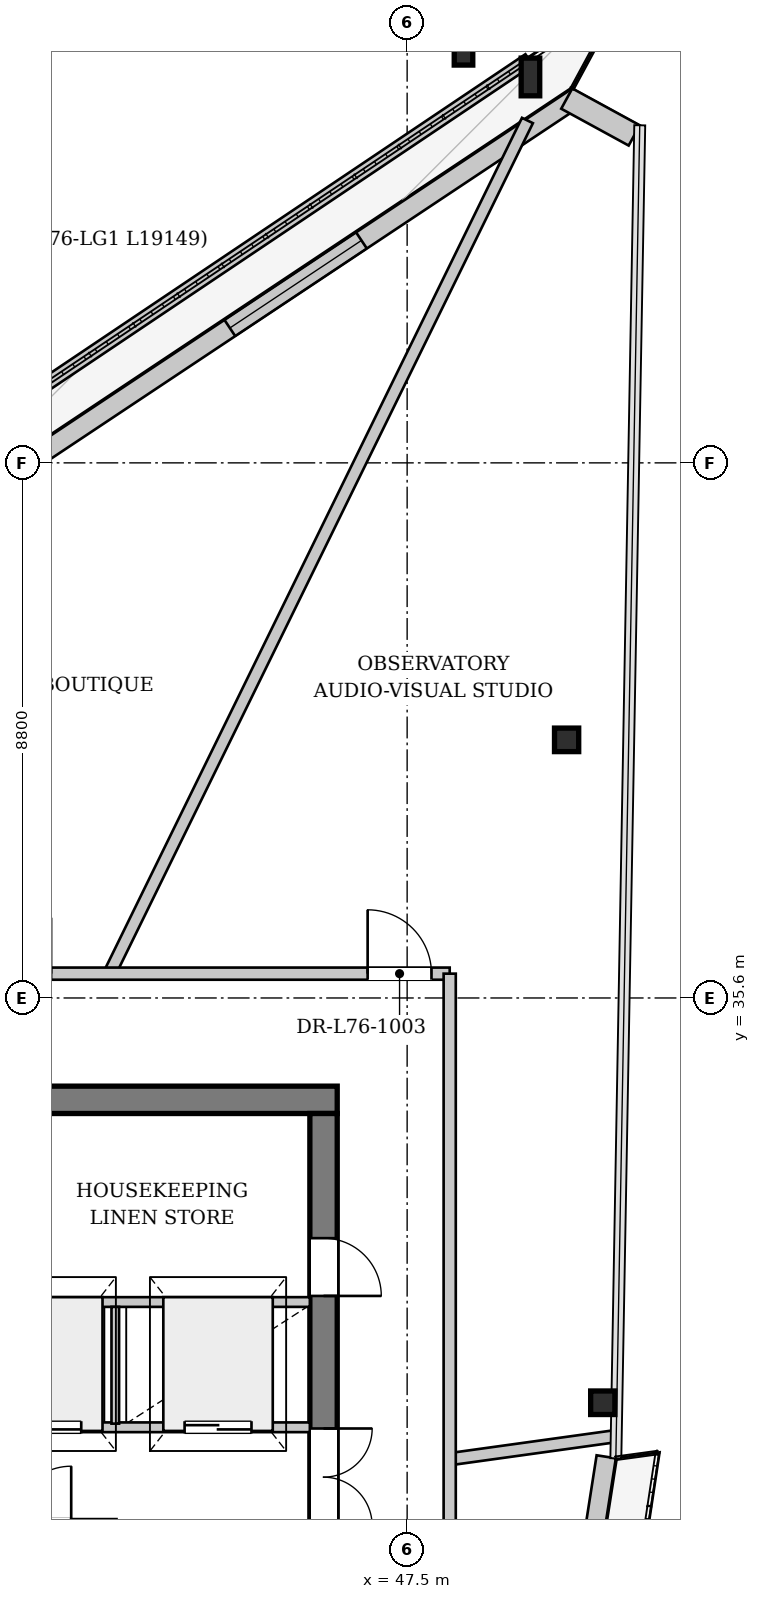
"""IFC4 building model, lengths in metres.
Left out: names, types, materials, properties, quantities, classifications, styles, units other than length and angle.
Written with IfcOpenShell. Run it as: python <this file> out.ifc"""

import sys

from ifc_helpers import new_model, si_unit, direction, frame, frame_2d, origin, origin_2d, place, context, subcontext, project, spatial, rectangle, i_section, extrude, source, transform, mapped, element, fill, save


model = new_model("IFC4")
c1 = context("Model", 3, precision=1e-05, world=origin(), true_north=direction((0.0, 1.0)))
c2 = subcontext(c1, "Body", "Model", "MODEL_VIEW")
j1 = project(units=[si_unit("LENGTHUNIT", "METRE"), si_unit("PLANEANGLEUNIT", "RADIAN")], contexts=[c1])
p1 = place(None, origin())
s1 = spatial("IfcSite", under=j1, at=p1, CompositionType="ELEMENT")
p2 = place(p1, origin())
s2 = spatial("IfcBuilding", under=s1, at=p2, CompositionType="ELEMENT")
p3 = place(p2, frame((0.0, 0.0, 286.1)))
s3 = spatial("IfcBuildingStorey", under=s2, at=p3, CompositionType="ELEMENT", Elevation=286.1)
m1 = source(origin(), c2, "Body", "SweptSolid", [
    extrude(i_section(OverallWidth=0.305, OverallDepth=0.62, WebThickness=0.021, FlangeThickness=0.04, at=origin_2d()), origin(), (0.0, 0.0, 1.0), 5.705),
])
p4 = place(p3, frame((51.325, 49.952, 0.0), z_axis=(-0.630132763972, 0.27858501144, 0.724791757107), x_axis=(-0.404351160465, -0.914603815338, 0.0)))
e1 = element("IfcColumn", 1, at=p4, inside=s3, PredefinedType="COLUMN", context=c2, shape_type="MappedRepresentation", body=[
    mapped(m1, transform((0.0, 0.0, 0.0), x_axis=(1.0, 0.0, 0.0), y_axis=(0.0, 1.0, 0.0), z_axis=(0.0, 0.0, 1.0), scale=1.0)),
])
m2 = source(origin(), c2, "Body", "SweptSolid", [
    extrude(i_section(OverallWidth=0.305, OverallDepth=0.62, WebThickness=0.021, FlangeThickness=0.04, at=origin_2d()), origin(), (0.0, 0.0, 1.0), 5.642),
])
p5 = place(p3, frame((50.216, 50.558, 0.0), z_axis=(-0.634270773304, 0.246127176869, 0.732886075007), x_axis=(-0.361764793743, -0.93226939991, 0.0)))
e2 = element("IfcColumn", 2, at=p5, inside=s3, PredefinedType="COLUMN", context=c2, shape_type="MappedRepresentation", body=[
    mapped(m2, transform((0.0, 0.0, 0.0), x_axis=(1.0, 0.0, 0.0), y_axis=(0.0, 1.0, 0.0), z_axis=(0.0, 0.0, 1.0), scale=1.0)),
])
m3 = source(origin(), c2, "Body", "SweptSolid", [
    extrude(i_section(OverallWidth=0.398, OverallDepth=0.387, WebThickness=0.019, FlangeThickness=0.029, at=origin_2d()), origin(), (0.0, 0.0, 1.0), 4.541),
])
p6 = place(p3, frame((50.932, 28.03, 0.0), z_axis=(-0.094735020085, 0.402220593223, 0.910628283306), x_axis=(-0.973365952515, -0.229256891904, 0.0)))
e3 = element("IfcColumn", 3, at=p6, inside=s3, PredefinedType="COLUMN", context=c2, shape_type="MappedRepresentation", body=[
    mapped(m3, transform((0.0, 0.0, 0.0), x_axis=(1.0, 0.0, 0.0), y_axis=(0.0, 1.0, 0.0), z_axis=(0.0, 0.0, 1.0), scale=1.0)),
])
m4 = source(origin(), c2, "Body", "SweptSolid", [
    extrude(i_section(OverallWidth=0.398, OverallDepth=0.387, WebThickness=0.019, FlangeThickness=0.029, at=origin_2d()), origin(), (0.0, 0.0, 1.0), 4.906),
])
p7 = place(p3, frame((51.129, 38.991, 0.0), z_axis=(-0.410278483219, 0.348119600936, 0.842902313232), x_axis=(-0.64698233698, -0.762504987286, 0.0)))
e4 = element("IfcColumn", 4, at=p7, inside=s3, PredefinedType="COLUMN", context=c2, shape_type="MappedRepresentation", body=[
    mapped(m4, transform((0.0, 0.0, 0.0), x_axis=(1.0, 0.0, 0.0), y_axis=(0.0, 1.0, 0.0), z_axis=(0.0, 0.0, 1.0), scale=1.0)),
])
p8 = place(p3, frame((50.774, 28.055, 0.0), z_axis=(0.0, 0.0, 1.0), x_axis=(-0.154256631158, -0.988030815179, 0.0)))
e5 = element("IfcWall", 5, at=p8, inside=s3, PredefinedType="SOLIDWALL", context=c2, shape_type="SweptSolid", body=[
    extrude(rectangle(XDim=21.925, YDim=0.32, at=frame_2d((10.962, 0.0))), origin(), (0.0, 0.0, 1.0), 3.662),
])
p9 = place(p8, frame((6.266, 0.0, 0.0)))
e6 = element("IfcOpeningElement", 6, at=p9, cuts=e5, PredefinedType="OPENING", context=c2, shape_type="SweptSolid", body=[
    extrude(rectangle(XDim=1.5, YDim=2.3, at=frame_2d((0.75, 1.15))), frame((0.0, 0.17, 0.0), z_axis=(0.0, -1.0, 0.0), x_axis=(1.0, 0.0, 0.0)), (0.0, 0.0, 1.0), 0.34),
])
p10 = place(p8, frame((14.924, 0.0, 0.65)))
e7 = element("IfcOpeningElement", 7, at=p10, cuts=e5, PredefinedType="OPENING", context=c2, shape_type="SweptSolid", body=[
    extrude(rectangle(XDim=2.6, YDim=2.35, at=frame_2d((1.3, 1.175))), frame((0.0, 0.17, 0.0), z_axis=(0.0, -1.0, 0.0), x_axis=(1.0, 0.0, 0.0)), (0.0, 0.0, 1.0), 0.34),
])
p11 = place(p3, frame((32.465, 38.554, 0.0), z_axis=(0.0, 0.0, 1.0), x_axis=(0.832540755873, 0.553963798285, 0.0)))
e8 = element("IfcWall", 8, at=p11, inside=s3, PredefinedType="SOLIDWALL", context=c2, shape_type="SweptSolid", body=[
    extrude(rectangle(XDim=21.428, YDim=0.32, at=frame_2d((10.714, 0.0))), origin(), (0.0, 0.0, 1.0), 3.662),
])
p12 = place(p11, frame((5.357, 0.0, 0.0)))
e9 = element("IfcOpeningElement", 9, at=p12, cuts=e8, PredefinedType="OPENING", context=c2, shape_type="SweptSolid", body=[
    extrude(rectangle(XDim=1.5, YDim=2.3, at=frame_2d((0.75, 1.15))), frame((0.0, 0.17, 0.0), z_axis=(0.0, -1.0, 0.0), x_axis=(1.0, 0.0, 0.0)), (0.0, 0.0, 1.0), 0.34),
])
p13 = place(p11, frame((14.557, 0.0, 0.65)))
e10 = element("IfcOpeningElement", 10, at=p13, cuts=e8, PredefinedType="OPENING", context=c2, shape_type="SweptSolid", body=[
    extrude(rectangle(XDim=2.6, YDim=2.35, at=frame_2d((1.3, 1.175))), frame((0.0, 0.17, 0.0), z_axis=(0.0, -1.0, 0.0), x_axis=(1.0, 0.0, 0.0)), (0.0, 0.0, 1.0), 0.34),
])
p14 = place(p3, frame((50.125, 50.391, 0.0), z_axis=(0.0, 0.0, 1.0), x_axis=(0.877570550329, -0.479447524965, 0.0)))
e11 = element("IfcWall", 11, at=p14, inside=s3, PredefinedType="SOLIDWALL", context=c2, shape_type="SweptSolid", body=[
    extrude(rectangle(XDim=1.264, YDim=0.38, at=frame_2d((0.632, 0.0))), origin(), (0.0, 0.0, 1.0), 3.662),
])
p15 = place(p3, frame((49.507, 51.03, 0.0), z_axis=(0.0, 0.0, 1.0), x_axis=(-0.830196011269, -0.557471598266, 0.0)))
e12 = element("IfcWall", 12, at=p15, inside=s3, PredefinedType="PARAPET", context=c2, shape_type="SweptSolid", body=[
    extrude(rectangle(XDim=19.149, YDim=0.22, at=frame_2d((9.574, 0.0))), origin(), (0.0, 0.0, 1.0), 0.3),
])
p16 = place(p3, frame((29.65, 33.925, 0.0), z_axis=(0.0, 0.0, 1.0), x_axis=(1.0, 0.0, 0.0)))
e13 = element("IfcWall", 13, at=p16, inside=s3, PredefinedType="SHEAR", context=c2, shape_type="SweptSolid", body=[
    extrude(rectangle(XDim=16.7, YDim=0.45, at=frame_2d((8.35, 0.0))), origin(), (0.0, 0.0, 1.0), 4.12),
])
p17 = place(p16, frame((1.45, 0.0, 0.0)))
e14 = element("IfcOpeningElement", 14, at=p17, cuts=e13, PredefinedType="OPENING", context=c2, shape_type="SweptSolid", body=[
    extrude(rectangle(XDim=0.95, YDim=2.1, at=frame_2d((0.475, 1.05))), frame((0.0, 0.235, 0.0), z_axis=(0.0, -1.0, 0.0), x_axis=(1.0, 0.0, 0.0)), (0.0, 0.0, 1.0), 0.47),
])
p18 = place(p16, frame((3.83, 0.0, 0.0)))
e15 = element("IfcOpeningElement", 15, at=p18, cuts=e13, PredefinedType="OPENING", context=c2, shape_type="SweptSolid", body=[
    extrude(rectangle(XDim=1.32, YDim=2.2, at=frame_2d((0.66, 1.1))), frame((0.0, 0.235, 0.0), z_axis=(0.0, -1.0, 0.0), x_axis=(1.0, 0.0, 0.0)), (0.0, 0.0, 1.0), 0.47),
])
p19 = place(p3, frame((46.125, 33.7, 0.0), z_axis=(0.0, 0.0, 1.0), x_axis=(0.0, -1.0, 0.0)))
e16 = element("IfcWall", 16, at=p19, inside=s3, PredefinedType="SHEAR", context=c2, shape_type="SweptSolid", body=[
    extrude(rectangle(XDim=14.2, YDim=0.45, at=frame_2d((7.1, 0.0))), origin(), (0.0, 0.0, 1.0), 4.12),
])
p20 = place(p19, frame((5.18, 0.0, 0.0)))
e17 = element("IfcOpeningElement", 17, at=p20, cuts=e16, PredefinedType="OPENING", context=c2, shape_type="SweptSolid", body=[
    extrude(rectangle(XDim=1.6, YDim=2.2, at=frame_2d((0.8, 1.1))), frame((0.0, 0.235, 0.0), z_axis=(0.0, -1.0, 0.0), x_axis=(1.0, 0.0, 0.0)), (0.0, 0.0, 1.0), 0.47),
])
p21 = place(p19, frame((2.05, 0.0, 0.0)))
e18 = element("IfcOpeningElement", 18, at=p21, cuts=e16, PredefinedType="OPENING", context=c2, shape_type="SweptSolid", body=[
    extrude(rectangle(XDim=0.95, YDim=2.1, at=frame_2d((0.475, 1.05))), frame((0.0, 0.235, 0.0), z_axis=(0.0, -1.0, 0.0), x_axis=(1.0, 0.0, 0.0)), (0.0, 0.0, 1.0), 0.47),
])
p22 = place(p3, frame((33.28, 26.95, 0.0), z_axis=(0.0, 0.0, 1.0), x_axis=(1.0, 0.0, 0.0)))
e19 = element("IfcWall", 19, at=p22, inside=s3, PredefinedType="PARTITIONING", context=c2, shape_type="SweptSolid", body=[
    extrude(rectangle(XDim=9.44, YDim=0.16, at=frame_2d((4.72, 0.0))), origin(), (0.0, 0.0, 1.0), 4.12),
])
p23 = place(p22, frame((1.2, 0.0, 0.0)))
e20 = element("IfcOpeningElement", 20, at=p23, cuts=e19, PredefinedType="OPENING", context=c2, shape_type="SweptSolid", body=[
    extrude(rectangle(XDim=0.95, YDim=2.1, at=frame_2d((0.475, 1.05))), frame((0.0, 0.09, 0.0), z_axis=(0.0, -1.0, 0.0), x_axis=(1.0, 0.0, 0.0)), (0.0, 0.0, 1.0), 0.18),
])
p24 = place(p22, frame((4.65, 0.0, 0.0)))
e21 = element("IfcOpeningElement", 21, at=p24, cuts=e19, PredefinedType="OPENING", context=c2, shape_type="SweptSolid", body=[
    extrude(rectangle(XDim=0.95, YDim=2.1, at=frame_2d((0.475, 1.05))), frame((0.0, 0.09, 0.0), z_axis=(0.0, -1.0, 0.0), x_axis=(1.0, 0.0, 0.0)), (0.0, 0.0, 1.0), 0.18),
])
p25 = place(p22, frame((7.745, 0.0, 0.0)))
e22 = element("IfcOpeningElement", 22, at=p25, cuts=e19, PredefinedType="OPENING", context=c2, shape_type="SweptSolid", body=[
    extrude(rectangle(XDim=0.95, YDim=2.1, at=frame_2d((0.475, 1.05))), frame((0.0, 0.09, 0.0), z_axis=(0.0, -1.0, 0.0), x_axis=(1.0, 0.0, 0.0)), (0.0, 0.0, 1.0), 0.18),
])
p26 = place(p3, frame((33.28, 28.54, 0.0), z_axis=(0.0, 0.0, 1.0), x_axis=(1.0, 0.0, 0.0)))
e23 = element("IfcWall", 23, at=p26, inside=s3, PredefinedType="PARTITIONING", context=c2, shape_type="SweptSolid", body=[
    extrude(rectangle(XDim=12.62, YDim=0.16, at=frame_2d((6.31, 0.0))), origin(), (0.0, 0.0, 1.0), 4.12),
])
p27 = place(p26, frame((0.8, 0.0, 0.0)))
e24 = element("IfcOpeningElement", 24, at=p27, cuts=e23, PredefinedType="OPENING", context=c2, shape_type="SweptSolid", body=[
    extrude(rectangle(XDim=0.95, YDim=2.1, at=frame_2d((0.475, 1.05))), frame((0.0, 0.09, 0.0), z_axis=(0.0, -1.0, 0.0), x_axis=(1.0, 0.0, 0.0)), (0.0, 0.0, 1.0), 0.18),
])
p28 = place(p26, frame((3.3, 0.0, 0.0)))
e25 = element("IfcOpeningElement", 25, at=p28, cuts=e23, PredefinedType="OPENING", context=c2, shape_type="SweptSolid", body=[
    extrude(rectangle(XDim=0.95, YDim=2.1, at=frame_2d((0.475, 1.05))), frame((0.0, 0.09, 0.0), z_axis=(0.0, -1.0, 0.0), x_axis=(1.0, 0.0, 0.0)), (0.0, 0.0, 1.0), 0.18),
])
p29 = place(p26, frame((5.63, 0.0, 0.0)))
e26 = element("IfcOpeningElement", 26, at=p29, cuts=e23, PredefinedType="OPENING", context=c2, shape_type="SweptSolid", body=[
    extrude(rectangle(XDim=1.1, YDim=2.2, at=frame_2d((0.55, 1.1))), frame((0.0, 0.09, 0.0), z_axis=(0.0, -1.0, 0.0), x_axis=(1.0, 0.0, 0.0)), (0.0, 0.0, 1.0), 0.18),
])
p30 = place(p26, frame((7.76, 0.0, 0.0)))
e27 = element("IfcOpeningElement", 27, at=p30, cuts=e23, PredefinedType="OPENING", context=c2, shape_type="SweptSolid", body=[
    extrude(rectangle(XDim=1.1, YDim=2.2, at=frame_2d((0.55, 1.1))), frame((0.0, 0.09, 0.0), z_axis=(0.0, -1.0, 0.0), x_axis=(1.0, 0.0, 0.0)), (0.0, 0.0, 1.0), 0.18),
])
p31 = place(p26, frame((10.56, 0.0, 0.0)))
e28 = element("IfcOpeningElement", 28, at=p31, cuts=e23, PredefinedType="OPENING", context=c2, shape_type="SweptSolid", body=[
    extrude(rectangle(XDim=1.1, YDim=2.2, at=frame_2d((0.55, 1.1))), frame((0.0, 0.09, 0.0), z_axis=(0.0, -1.0, 0.0), x_axis=(1.0, 0.0, 0.0)), (0.0, 0.0, 1.0), 0.18),
])
p32 = place(p3, frame((40.72, 30.6, 0.0), z_axis=(0.0, 0.0, 1.0), x_axis=(1.0, 0.0, 0.0)))
e29 = element("IfcWall", 29, at=p32, inside=s3, PredefinedType="PARTITIONING", context=c2, shape_type="SweptSolid", body=[
    extrude(rectangle(XDim=5.18, YDim=0.16, at=frame_2d((2.59, 0.0))), origin(), (0.0, 0.0, 1.0), 4.12),
])
p33 = place(p3, frame((42.7, 28.6, 0.0), z_axis=(0.0, 0.0, 1.0), x_axis=(0.0, 1.0, 0.0)))
e30 = element("IfcWall", 30, at=p33, inside=s3, PredefinedType="PARTITIONING", context=c2, shape_type="SweptSolid", body=[
    extrude(rectangle(XDim=1.92, YDim=0.125, at=frame_2d((0.96, 0.0))), origin(), (0.0, 0.0, 1.0), 4.12),
])
p34 = place(p3, frame((48.2, 28.015, 0.0), z_axis=(0.0, 0.0, 1.0), x_axis=(0.990516249749, 0.137395629415, 0.0)))
e31 = element("IfcWall", 31, at=p34, inside=s3, PredefinedType="PARTITIONING", context=c2, shape_type="SweptSolid", body=[
    extrude(rectangle(XDim=2.735, YDim=0.2, at=frame_2d((1.367, 0.0))), origin(), (0.0, 0.0, 1.0), 4.12),
])
p35 = place(p3, frame((42.605, 36.0, 0.0), z_axis=(0.0, 0.0, 1.0), x_axis=(0.439942035574, 0.898026171854, 0.0)))
e32 = element("IfcWall", 32, at=p35, inside=s3, PredefinedType="PARTITIONING", context=c2, shape_type="SweptSolid", body=[
    extrude(rectangle(XDim=15.624, YDim=0.2, at=frame_2d((7.812, 0.0))), origin(), (0.0, 0.0, 1.0), 4.12),
])
p36 = place(p3, frame((29.402, 36.0, 0.0), z_axis=(0.0, 0.0, 1.0), x_axis=(1.0, 0.0, 0.0)))
e33 = element("IfcWall", 33, at=p36, inside=s3, PredefinedType="PARTITIONING", context=c2, shape_type="SweptSolid", body=[
    extrude(rectangle(XDim=18.798, YDim=0.2, at=frame_2d((9.399, 0.0))), origin(), (0.0, 0.0, 1.0), 4.12),
])
p37 = place(p36, frame((17.448, 0.0, 0.0)))
e34 = element("IfcOpeningElement", 34, at=p37, cuts=e33, PredefinedType="OPENING", context=c2, shape_type="SweptSolid", body=[
    extrude(rectangle(XDim=1.05, YDim=2.2, at=frame_2d((0.525, 1.1))), frame((0.0, 0.11, 0.0), z_axis=(0.0, -1.0, 0.0), x_axis=(1.0, 0.0, 0.0)), (0.0, 0.0, 1.0), 0.22),
])
p38 = place(p36, frame((11.322, 0.0, 0.0)))
e35 = element("IfcOpeningElement", 35, at=p38, cuts=e33, PredefinedType="OPENING", context=c2, shape_type="SweptSolid", body=[
    extrude(rectangle(XDim=0.92, YDim=2.1, at=frame_2d((0.46, 1.05))), frame((0.0, 0.11, 0.0), z_axis=(0.0, -1.0, 0.0), x_axis=(1.0, 0.0, 0.0)), (0.0, 0.0, 1.0), 0.22),
])
p39 = place(p36, frame((6.742, 0.0, 0.0)))
e36 = element("IfcOpeningElement", 36, at=p39, cuts=e33, PredefinedType="OPENING", context=c2, shape_type="SweptSolid", body=[
    extrude(rectangle(XDim=0.9, YDim=2.1, at=frame_2d((0.45, 1.05))), frame((0.0, 0.11, 0.0), z_axis=(0.0, -1.0, 0.0), x_axis=(1.0, 0.0, 0.0)), (0.0, 0.0, 1.0), 0.22),
])
p40 = place(p3, frame((48.2, 23.0, 0.0), z_axis=(0.0, 0.0, 1.0), x_axis=(0.0, 1.0, 0.0)))
e37 = element("IfcWall", 37, at=p40, inside=s3, PredefinedType="PARTITIONING", context=c2, shape_type="SweptSolid", body=[
    extrude(rectangle(XDim=13.0, YDim=0.2, at=frame_2d((6.5, 0.0))), origin(), (0.0, 0.0, 1.0), 3.745),
])
m5 = source(origin(), c2, "Body", "SweptSolid", [
    extrude(rectangle(XDim=2.6, YDim=2.35, at=frame_2d((1.3, 1.175))), frame((0.0, 0.03, 0.0), z_axis=(0.0, -1.0, 0.0), x_axis=(1.0, 0.0, 0.0)), (0.0, 0.0, 1.0), 0.06),
])
p41 = place(p13, origin())
e38 = element("IfcWindow", 38, at=p41, inside=s3, PartitioningType="SINGLE_PANEL", PredefinedType="WINDOW", context=c2, shape_type="MappedRepresentation", body=[
    mapped(m5, transform((0.0, 0.0, 0.0), x_axis=(1.0, 0.0, 0.0), y_axis=(0.0, 1.0, 0.0), z_axis=(0.0, 0.0, 1.0), scale=1.0)),
])
fill(e10, e38)
m6 = source(origin(), c2, "Body", "SweptSolid", [
    extrude(rectangle(XDim=1.6, YDim=2.2, at=frame_2d((0.8, 1.1))), frame((0.0, 0.025, 0.0), z_axis=(0.0, -1.0, 0.0), x_axis=(1.0, 0.0, 0.0)), (0.0, 0.0, 1.0), 0.05),
])
p42 = place(p20, origin())
e39 = element("IfcDoor", 39, at=p42, inside=s3, OperationType="DOUBLE_DOOR_SINGLE_SWING", PredefinedType="DOOR", context=c2, shape_type="MappedRepresentation", body=[
    mapped(m6, transform((0.0, 0.0, 0.0), x_axis=(1.0, 0.0, 0.0), y_axis=(0.0, 1.0, 0.0), z_axis=(0.0, 0.0, 1.0), scale=1.0)),
])
fill(e17, e39)
m7 = source(origin(), c2, "Body", "SweptSolid", [
    extrude(rectangle(XDim=1.1, YDim=2.2, at=frame_2d((0.55, 1.1))), frame((0.0, 0.025, 0.0), z_axis=(0.0, -1.0, 0.0), x_axis=(1.0, 0.0, 0.0)), (0.0, 0.0, 1.0), 0.05),
])
p43 = place(p30, origin())
e40 = element("IfcDoor", 40, at=p43, inside=s3, OperationType="DOUBLE_DOOR_SLIDING", PredefinedType="DOOR", context=c2, shape_type="MappedRepresentation", body=[
    mapped(m7, transform((0.0, 0.0, 0.0), x_axis=(1.0, 0.0, 0.0), y_axis=(0.0, 1.0, 0.0), z_axis=(0.0, 0.0, 1.0), scale=1.0)),
])
fill(e27, e40)
p44 = place(p31, origin())
e41 = element("IfcDoor", 41, at=p44, inside=s3, OperationType="DOUBLE_DOOR_SLIDING", PredefinedType="DOOR", context=c2, shape_type="MappedRepresentation", body=[
    mapped(m7, transform((0.0, 0.0, 0.0), x_axis=(1.0, 0.0, 0.0), y_axis=(0.0, 1.0, 0.0), z_axis=(0.0, 0.0, 1.0), scale=1.0)),
])
fill(e28, e41)
m8 = source(origin(), c2, "Body", "SweptSolid", [
    extrude(rectangle(XDim=0.95, YDim=2.1, at=frame_2d((0.475, 1.05))), frame((0.0, 0.025, 0.0), z_axis=(0.0, -1.0, 0.0), x_axis=(1.0, 0.0, 0.0)), (0.0, 0.0, 1.0), 0.05),
])
p45 = place(p21, origin())
e42 = element("IfcDoor", 42, at=p45, inside=s3, OperationType="SINGLE_SWING_RIGHT", PredefinedType="DOOR", context=c2, shape_type="MappedRepresentation", body=[
    mapped(m8, transform((0.0, 0.0, 0.0), x_axis=(1.0, 0.0, 0.0), y_axis=(0.0, 1.0, 0.0), z_axis=(0.0, 0.0, 1.0), scale=1.0)),
])
fill(e18, e42)
m9 = source(origin(), c2, "Body", "SweptSolid", [
    extrude(rectangle(XDim=1.05, YDim=2.2, at=frame_2d((0.525, 1.1))), frame((0.0, 0.025, 0.0), z_axis=(0.0, -1.0, 0.0), x_axis=(1.0, 0.0, 0.0)), (0.0, 0.0, 1.0), 0.05),
])
p46 = place(p37, origin())
e43 = element("IfcDoor", 43, at=p46, inside=s3, OperationType="SINGLE_SWING_LEFT", PredefinedType="DOOR", context=c2, shape_type="MappedRepresentation", body=[
    mapped(m9, transform((0.0, 0.0, 0.0), x_axis=(1.0, 0.0, 0.0), y_axis=(0.0, 1.0, 0.0), z_axis=(0.0, 0.0, 1.0), scale=1.0)),
])
fill(e34, e43)
save(model, sys.argv[1])
